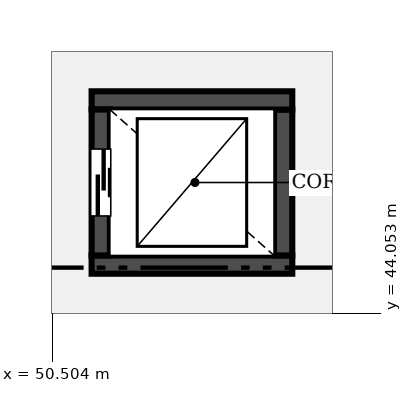
"""IFC4 building model, lengths in metres.
Left out: names, types, materials, properties, quantities, classifications, styles, units other than length and angle.
Written with IfcOpenShell. Run it as: python <this file> out.ifc"""

import sys

from ifc_helpers import new_model, si_unit, direction, frame, frame_2d, origin, place, context, subcontext, project, spatial, rectangle, extrude, element, fill, save


model = new_model("IFC4")
c1 = context("Model", 3, precision=1e-05, world=origin(), true_north=direction((0.0, 1.0)))
c2 = subcontext(c1, "Body", "Model", "MODEL_VIEW")
j1 = project(units=[si_unit("LENGTHUNIT", "METRE"), si_unit("PLANEANGLEUNIT", "RADIAN")], contexts=[c1])
p1 = place(None, origin())
s1 = spatial("IfcSite", under=j1, at=p1, CompositionType="ELEMENT")
p2 = place(p1, origin())
s2 = spatial("IfcBuilding", under=s1, at=p2, CompositionType="ELEMENT")
p3 = place(p2, frame((0.0, 0.0, 9.9)))
s3 = spatial("IfcBuildingStorey", under=s2, at=p3, CompositionType="ELEMENT", Elevation=9.9)
p4 = place(p3, frame((51.15, 44.85, 0.0), z_axis=(0.0, 0.0, 1.0), x_axis=(1.0, 0.0, 0.0)))
e1 = element("IfcWall", 1, at=p4, inside=s3, PredefinedType="SHEAR", context=c2, shape_type="SweptSolid", body=[
    extrude(rectangle(XDim=3.3, YDim=0.3, at=frame_2d((1.65, 0.0))), origin(), (0.0, 0.0, 1.0), 3.6),
])
p5 = place(p3, frame((54.3, 45.0, 0.0), z_axis=(0.0, 0.0, 1.0), x_axis=(0.0, 1.0, 0.0)))
e2 = element("IfcWall", 2, at=p5, inside=s3, PredefinedType="SHEAR", context=c2, shape_type="SweptSolid", body=[
    extrude(rectangle(XDim=2.4, YDim=0.3, at=frame_2d((1.2, 0.0))), origin(), (0.0, 0.0, 1.0), 3.6),
])
p6 = place(p3, frame((54.45, 47.55, 0.0), z_axis=(0.0, 0.0, 1.0), x_axis=(-1.0, 0.0, 0.0)))
e3 = element("IfcWall", 3, at=p6, inside=s3, PredefinedType="SHEAR", context=c2, shape_type="SweptSolid", body=[
    extrude(rectangle(XDim=3.3, YDim=0.3, at=frame_2d((1.65, 0.0))), origin(), (0.0, 0.0, 1.0), 3.6),
])
p7 = place(p3, frame((51.3, 47.4, 0.0), z_axis=(0.0, 0.0, 1.0), x_axis=(0.0, -1.0, 0.0)))
e4 = element("IfcWall", 4, at=p7, inside=s3, PredefinedType="SHEAR", context=c2, shape_type="SweptSolid", body=[
    extrude(rectangle(XDim=2.4, YDim=0.3, at=frame_2d((1.2, 0.0))), origin(), (0.0, 0.0, 1.0), 3.6),
])
p8 = place(p7, frame((0.65, 0.0, 0.0)))
e5 = element("IfcOpeningElement", 5, at=p8, cuts=e4, PredefinedType="OPENING", context=c2, shape_type="SweptSolid", body=[
    extrude(rectangle(XDim=1.1, YDim=2.2, at=frame_2d((0.55, 1.1))), frame((0.0, 0.16, 0.0), z_axis=(0.0, -1.0, 0.0), x_axis=(1.0, 0.0, 0.0)), (0.0, 0.0, 1.0), 0.32),
])
p9 = place(p8, origin())
e6 = element("IfcDoor", 6, at=p9, inside=s3, OperationType="SLIDING_TO_LEFT", PredefinedType="DOOR", context=c2, shape_type="SweptSolid", body=[
    extrude(rectangle(XDim=1.1, YDim=2.2, at=frame_2d((0.55, 1.1))), frame((0.0, 0.025, 0.0), z_axis=(0.0, -1.0, 0.0), x_axis=(1.0, 0.0, 0.0)), (0.0, 0.0, 1.0), 0.05),
])
fill(e5, e6)
save(model, sys.argv[1])
